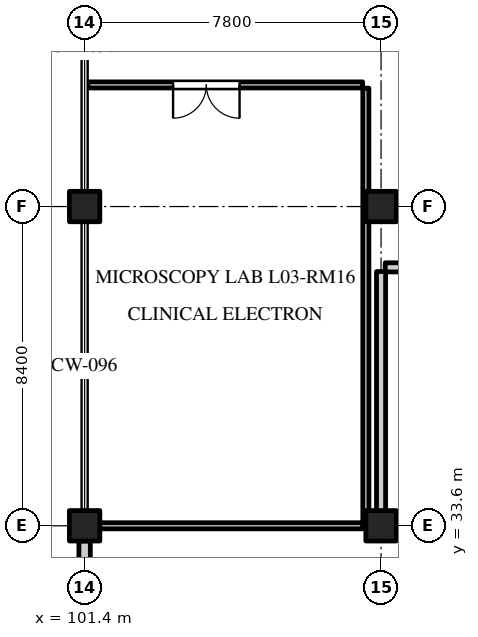
"""IFC4 building model, lengths in metres.
Left out: names, types, materials, properties, quantities, classifications, styles, units other than length and angle.
Written with IfcOpenShell. Run it as: python <this file> out.ifc"""

import sys

from ifc_helpers import new_model, si_unit, direction, frame, frame_2d, origin, origin_2d, place, context, subcontext, project, spatial, rectangle, extrude, element, fill, save


model = new_model("IFC4")
c1 = context("Model", 3, precision=1e-05, world=origin(), true_north=direction((0.0, 1.0)))
c2 = subcontext(c1, "Body", "Model", "MODEL_VIEW")
j1 = project(units=[si_unit("LENGTHUNIT", "METRE"), si_unit("PLANEANGLEUNIT", "RADIAN")], contexts=[c1])
p1 = place(None, origin())
s1 = spatial("IfcSite", under=j1, at=p1, CompositionType="ELEMENT")
p2 = place(p1, origin())
s2 = spatial("IfcBuilding", under=s1, at=p2, CompositionType="ELEMENT")
p3 = place(p2, frame((0.0, 0.0, 14.4)))
s3 = spatial("IfcBuildingStorey", under=s2, at=p3, CompositionType="ELEMENT", Elevation=14.4)
for number, where, z_axis, x_axis in (
    (1, (101.4, 33.6, 0.0), (0.0, 0.0, 1.0), (1.0, 0.0, 0.0)),
    (2, (101.4, 42.0, 0.0), (0.0, 0.0, 1.0), (1.0, 0.0, 0.0)),
    (3, (109.2, 33.6, 0.0), (0.0, 0.0, 1.0), (1.0, 0.0, 0.0)),
    (4, (109.2, 42.0, 0.0), (0.0, 0.0, 1.0), (1.0, 0.0, 0.0)),
):
    element("IfcColumn", number, at=place(p3, frame(where, z_axis=z_axis, x_axis=x_axis)), inside=s3, PredefinedType="COLUMN", context=c2, shape_type="SweptSolid", body=[
        extrude(rectangle(XDim=0.8, YDim=0.8, at=origin_2d()), origin(), (0.0, 0.0, 1.0), 3.6),
    ])
p4 = place(p3, frame((101.4, 25.6, 0.0), z_axis=(0.0, 0.0, 1.0), x_axis=(0.0, 1.0, 0.0)))
e5 = element("IfcWall", 5, at=p4, inside=s3, PredefinedType="STANDARD", context=c2, shape_type="SweptSolid", body=[
    extrude(rectangle(XDim=7.6, YDim=0.3, at=frame_2d((3.8, 0.0))), origin(), (0.0, 0.0, 1.0), 2.62),
])
p5 = place(p4, frame((0.58, 0.0, 0.8)))
e6 = element("IfcOpeningElement", 6, at=p5, cuts=e5, PredefinedType="OPENING", context=c2, shape_type="SweptSolid", body=[
    extrude(rectangle(XDim=1.4, YDim=1.6, at=frame_2d((0.7, 0.8))), frame((0.0, 0.162, 0.0), z_axis=(0.0, -1.0, 0.0), x_axis=(1.0, 0.0, 0.0)), (0.0, 0.0, 1.0), 0.324),
])
p6 = place(p4, frame((3.1, 0.0, 0.8)))
e7 = element("IfcOpeningElement", 7, at=p6, cuts=e5, PredefinedType="OPENING", context=c2, shape_type="SweptSolid", body=[
    extrude(rectangle(XDim=1.4, YDim=1.6, at=frame_2d((0.7, 0.8))), frame((0.0, 0.162, 0.0), z_axis=(0.0, -1.0, 0.0), x_axis=(1.0, 0.0, 0.0)), (0.0, 0.0, 1.0), 0.324),
])
p7 = place(p4, frame((5.62, 0.0, 0.8)))
e8 = element("IfcOpeningElement", 8, at=p7, cuts=e5, PredefinedType="OPENING", context=c2, shape_type="SweptSolid", body=[
    extrude(rectangle(XDim=1.4, YDim=1.6, at=frame_2d((0.7, 0.8))), frame((0.0, 0.162, 0.0), z_axis=(0.0, -1.0, 0.0), x_axis=(1.0, 0.0, 0.0)), (0.0, 0.0, 1.0), 0.324),
])
p8 = place(p3, frame((109.31, 40.4, 0.0), z_axis=(0.0, 0.0, 1.0), x_axis=(1.0, 0.0, 0.0)))
e9 = element("IfcWall", 9, at=p8, inside=s3, PredefinedType="STANDARD", context=c2, shape_type="SweptSolid", body=[
    extrude(rectangle(XDim=23.18, YDim=0.24, at=frame_2d((11.59, 0.0))), origin(), (0.0, 0.0, 1.0), 3.25),
])
p9 = place(p8, frame((1.986, 0.0, 0.0)))
e10 = element("IfcOpeningElement", 10, at=p9, cuts=e9, PredefinedType="OPENING", context=c2, shape_type="SweptSolid", body=[
    extrude(rectangle(XDim=1.15, YDim=2.15, at=frame_2d((0.575, 1.075))), frame((0.0, 0.132, 0.0), z_axis=(0.0, -1.0, 0.0), x_axis=(1.0, 0.0, 0.0)), (0.0, 0.0, 1.0), 0.264),
])
p10 = place(p3, frame((109.31, 33.6, 0.0), z_axis=(0.0, 0.0, 1.0), x_axis=(1.0, 0.0, 0.0)))
e11 = element("IfcWall", 11, at=p10, inside=s3, PredefinedType="STANDARD", context=c2, shape_type="SweptSolid", body=[
    extrude(rectangle(XDim=23.18, YDim=0.24, at=frame_2d((11.59, 0.0))), origin(), (0.0, 0.0, 1.0), 2.62),
])
p11 = place(p3, frame((109.2, 33.71, 0.0), z_axis=(0.0, 0.0, 1.0), x_axis=(0.0, 1.0, 0.0)))
e12 = element("IfcWall", 12, at=p11, inside=s3, PredefinedType="STANDARD", context=c2, shape_type="SweptSolid", body=[
    extrude(rectangle(XDim=6.58, YDim=0.24, at=frame_2d((3.29, 0.0))), origin(), (0.0, 0.0, 1.0), 3.25),
])
p12 = place(p3, frame((101.485, 45.2, 0.0), z_axis=(0.0, 0.0, 1.0), x_axis=(1.0, 0.0, 0.0)))
e13 = element("IfcWall", 13, at=p12, inside=s3, PredefinedType="PARTITIONING", context=c2, shape_type="SweptSolid", body=[
    extrude(rectangle(XDim=7.23, YDim=0.16, at=frame_2d((3.615, 0.0))), origin(), (0.0, 0.0, 1.0), 3.25),
])
p13 = place(p12, frame((2.242, 0.0, 0.0)))
e14 = element("IfcOpeningElement", 14, at=p13, cuts=e13, PredefinedType="OPENING", context=c2, shape_type="SweptSolid", body=[
    extrude(rectangle(XDim=1.75, YDim=2.3, at=frame_2d((0.875, 1.15))), frame((0.0, 0.092, 0.0), z_axis=(0.0, -1.0, 0.0), x_axis=(1.0, 0.0, 0.0)), (0.0, 0.0, 1.0), 0.184),
])
p14 = place(p3, frame((101.485, 33.6, 0.0), z_axis=(0.0, 0.0, 1.0), x_axis=(1.0, 0.0, 0.0)))
e15 = element("IfcWall", 15, at=p14, inside=s3, PredefinedType="PARTITIONING", context=c2, shape_type="SweptSolid", body=[
    extrude(rectangle(XDim=7.23, YDim=0.16, at=frame_2d((3.615, 0.0))), origin(), (0.0, 0.0, 1.0), 2.62),
])
p15 = place(p3, frame((101.4, 41.64, 0.0), z_axis=(0.0, 0.0, 1.0), x_axis=(0.0, 1.0, 0.0)))
e16 = element("IfcWall", 16, at=p15, inside=s3, PredefinedType="PARTITIONING", context=c2, shape_type="SweptSolid", body=[
    extrude(rectangle(XDim=0.72, YDim=0.16, at=frame_2d((0.36, 0.0))), origin(), (0.0, 0.0, 1.0), 2.62),
])
p16 = place(p3, frame((108.8, 33.685, 0.0), z_axis=(0.0, 0.0, 1.0), x_axis=(0.0, 1.0, 0.0)))
e17 = element("IfcWall", 17, at=p16, inside=s3, PredefinedType="PARTITIONING", context=c2, shape_type="SweptSolid", body=[
    extrude(rectangle(XDim=11.43, YDim=0.16, at=frame_2d((5.715, 0.0))), origin(), (0.0, 0.0, 1.0), 3.25),
])
p17 = place(p3, frame((108.755, 33.6, 0.0), z_axis=(0.0, 0.0, 1.0), x_axis=(1.0, 0.0, 0.0)))
e18 = element("IfcWall", 18, at=p17, inside=s3, PredefinedType="PARTITIONING", context=c2, shape_type="SweptSolid", body=[
    extrude(rectangle(XDim=0.515, YDim=0.14, at=frame_2d((0.258, 0.0))), origin(), (0.0, 0.0, 1.0), 2.62),
])
p18 = place(p13, frame((1.75, 0.0, 0.0), z_axis=(0.0, 0.0, 1.0), x_axis=(-1.0, 0.0, 0.0)))
e19 = element("IfcDoor", 19, at=p18, inside=s3, OperationType="DOUBLE_DOOR_SINGLE_SWING", PredefinedType="DOOR", context=c2, shape_type="SweptSolid", body=[
    extrude(rectangle(XDim=1.75, YDim=2.3, at=frame_2d((0.875, 1.15))), frame((0.0, 0.025, 0.0), z_axis=(0.0, -1.0, 0.0), x_axis=(1.0, 0.0, 0.0)), (0.0, 0.0, 1.0), 0.05),
])
fill(e14, e19)
save(model, sys.argv[1])
